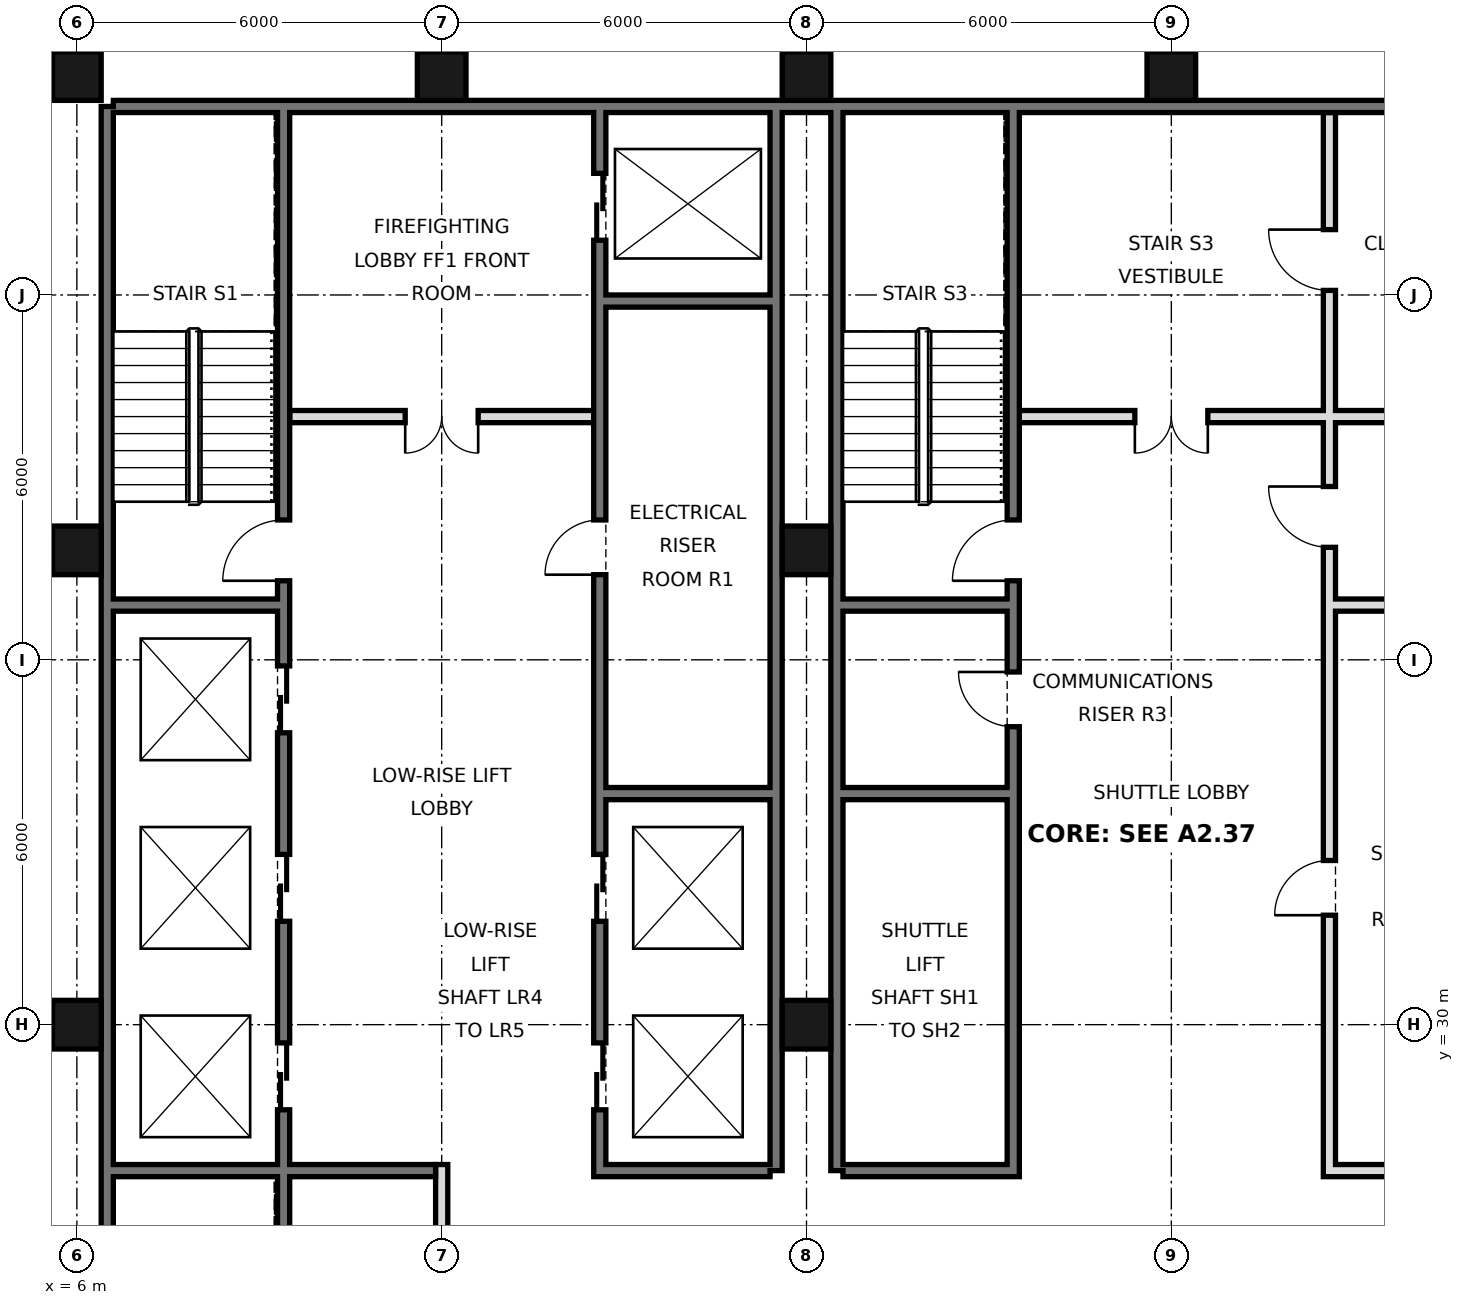
"""IFC4 building model, lengths in metres.
Left out: names, types, materials, properties, quantities, classifications, styles, units other than length and angle.
Written with IfcOpenShell. Run it as: python <this file> out.ifc"""

import sys

from ifc_helpers import new_model, si_unit, direction, frame, frame_2d, origin, origin_2d, place, context, subcontext, project, spatial, rectangle, hollow_rectangle, extrude, element, fill, save


model = new_model("IFC4")
c1 = context("Model", 3, precision=1e-05, world=origin(), true_north=direction((0.0, 1.0)))
c2 = subcontext(c1, "Body", "Model", "MODEL_VIEW")
j1 = project(units=[si_unit("LENGTHUNIT", "METRE"), si_unit("PLANEANGLEUNIT", "RADIAN")], contexts=[c1])
p1 = place(None, origin())
s1 = spatial("IfcSite", under=j1, at=p1, CompositionType="ELEMENT")
p2 = place(p1, origin())
s2 = spatial("IfcBuilding", under=s1, at=p2, CompositionType="ELEMENT")
p3 = place(p2, frame((0.0, 0.0, 147.4)))
s3 = spatial("IfcBuildingStorey", under=s2, at=p3, CompositionType="ELEMENT", Elevation=147.4)
for number, where, z_axis, x_axis in (
    (1, (6.0, 30.0, 0.0), (0.0, 0.0, 1.0), (1.0, 0.0, 0.0)),
    (2, (6.0, 37.8, 0.0), (0.0, 0.0, 1.0), (1.0, 0.0, 0.0)),
    (3, (6.0, 45.6, 0.0), (0.0, 0.0, 1.0), (1.0, 0.0, 0.0)),
    (4, (12.0, 45.6, 0.0), (0.0, 0.0, 1.0), (1.0, 0.0, 0.0)),
    (5, (18.0, 30.0, 0.0), (0.0, 0.0, 1.0), (1.0, 0.0, 0.0)),
    (6, (18.0, 37.8, 0.0), (0.0, 0.0, 1.0), (1.0, 0.0, 0.0)),
    (7, (18.0, 45.6, 0.0), (0.0, 0.0, 1.0), (1.0, 0.0, 0.0)),
    (8, (24.0, 45.6, 0.0), (0.0, 0.0, 1.0), (1.0, 0.0, 0.0)),
):
    element("IfcColumn", number, at=place(p3, frame(where, z_axis=z_axis, x_axis=x_axis)), inside=s3, PredefinedType="COLUMN", context=c2, shape_type="SweptSolid", body=[
        extrude(hollow_rectangle(XDim=0.8, YDim=0.8, WallThickness=0.045, at=origin_2d()), origin(), (0.0, 0.0, 1.0), 3.6),
    ])
p4 = place(p3, frame((6.5, 21.6, 0.0), z_axis=(0.0, 0.0, 1.0), x_axis=(0.0, 1.0, 0.0)))
e9 = element("IfcWall", 9, at=p4, inside=s3, PredefinedType="SOLIDWALL", context=c2, shape_type="SweptSolid", body=[
    extrude(rectangle(XDim=23.5, YDim=0.2, at=frame_2d((11.75, 0.0))), origin(), (0.0, 0.0, 1.0), 3.42),
])
p5 = place(p3, frame((6.6, 45.1, 0.0), z_axis=(0.0, 0.0, 1.0), x_axis=(1.0, 0.0, 0.0)))
e10 = element("IfcWall", 10, at=p5, inside=s3, PredefinedType="SOLIDWALL", context=c2, shape_type="SweptSolid", body=[
    extrude(rectangle(XDim=34.8, YDim=0.2, at=frame_2d((17.4, 0.0))), origin(), (0.0, 0.0, 1.0), 3.42),
])
for number, where, z_axis, x_axis in (
    (11, (17.5, 27.6, 0.0), (0.0, 0.0, 1.0), (0.0, 1.0, 0.0)),
    (12, (18.5, 27.6, 0.0), (0.0, 0.0, 1.0), (0.0, 1.0, 0.0)),
):
    element("IfcWall", number, at=place(p3, frame(where, z_axis=z_axis, x_axis=x_axis)), inside=s3, PredefinedType="SOLIDWALL", context=c2, shape_type="SweptSolid", body=[
        extrude(rectangle(XDim=17.5, YDim=0.2, at=frame_2d((8.75, 0.0))), origin(), (0.0, 0.0, 1.0), 3.42),
    ])
p6 = place(p3, frame((12.0, 21.6, 0.0), z_axis=(0.0, 0.0, 1.0), x_axis=(0.0, 1.0, 0.0)))
e13 = element("IfcWall", 13, at=p6, inside=s3, PredefinedType="PARTITIONING", context=c2, shape_type="SweptSolid", body=[
    extrude(rectangle(XDim=6.1, YDim=0.2, at=frame_2d((3.05, 0.0))), origin(), (0.0, 0.0, 1.0), 3.42),
])
p7 = place(p3, frame((14.6, 27.5, 0.0), z_axis=(0.0, 0.0, 1.0), x_axis=(0.0, 1.0, 0.0)))
e14 = element("IfcWall", 14, at=p7, inside=s3, PredefinedType="SOLIDWALL", context=c2, shape_type="SweptSolid", body=[
    extrude(rectangle(XDim=17.5, YDim=0.2, at=frame_2d((8.75, 0.0))), origin(), (0.0, 0.0, 1.0), 3.42),
])
p8 = place(p7, frame((1.1, 0.0, 0.0)))
e15 = element("IfcOpeningElement", 15, at=p8, cuts=e14, PredefinedType="OPENING", context=c2, shape_type="SweptSolid", body=[
    extrude(rectangle(XDim=1.1, YDim=2.1, at=frame_2d((0.55, 1.05))), frame((0.0, 0.11, 0.0), z_axis=(0.0, -1.0, 0.0), x_axis=(1.0, 0.0, 0.0)), (0.0, 0.0, 1.0), 0.22),
])
p9 = place(p7, frame((4.2, 0.0, 0.0)))
e16 = element("IfcOpeningElement", 16, at=p9, cuts=e14, PredefinedType="OPENING", context=c2, shape_type="SweptSolid", body=[
    extrude(rectangle(XDim=1.1, YDim=2.1, at=frame_2d((0.55, 1.05))), frame((0.0, 0.11, 0.0), z_axis=(0.0, -1.0, 0.0), x_axis=(1.0, 0.0, 0.0)), (0.0, 0.0, 1.0), 0.22),
])
p10 = place(p7, frame((15.4, 0.0, 0.0)))
e17 = element("IfcOpeningElement", 17, at=p10, cuts=e14, PredefinedType="OPENING", context=c2, shape_type="SweptSolid", body=[
    extrude(rectangle(XDim=1.1, YDim=2.1, at=frame_2d((0.55, 1.05))), frame((0.0, 0.11, 0.0), z_axis=(0.0, -1.0, 0.0), x_axis=(1.0, 0.0, 0.0)), (0.0, 0.0, 1.0), 0.22),
])
p11 = place(p7, frame((9.9, 0.0, 0.0)))
e18 = element("IfcOpeningElement", 18, at=p11, cuts=e14, PredefinedType="OPENING", context=c2, shape_type="SweptSolid", body=[
    extrude(rectangle(XDim=0.9, YDim=2.1, at=frame_2d((0.45, 1.05))), frame((0.0, 0.11, 0.0), z_axis=(0.0, -1.0, 0.0), x_axis=(1.0, 0.0, 0.0)), (0.0, 0.0, 1.0), 0.22),
])
p12 = place(p3, frame((21.4, 27.5, 0.0), z_axis=(0.0, 0.0, 1.0), x_axis=(0.0, 1.0, 0.0)))
e19 = element("IfcWall", 19, at=p12, inside=s3, PredefinedType="SOLIDWALL", context=c2, shape_type="SweptSolid", body=[
    extrude(rectangle(XDim=17.5, YDim=0.2, at=frame_2d((8.75, 0.0))), origin(), (0.0, 0.0, 1.0), 3.42),
])
p13 = place(p12, frame((9.8, 0.0, 0.0)))
e20 = element("IfcOpeningElement", 20, at=p13, cuts=e19, PredefinedType="OPENING", context=c2, shape_type="SweptSolid", body=[
    extrude(rectangle(XDim=1.0, YDim=2.1, at=frame_2d((0.5, 1.05))), frame((0.0, 0.11, 0.0), z_axis=(0.0, -1.0, 0.0), x_axis=(1.0, 0.0, 0.0)), (0.0, 0.0, 1.0), 0.22),
])
p14 = place(p12, frame((7.4, 0.0, 0.0)))
e21 = element("IfcOpeningElement", 21, at=p14, cuts=e19, PredefinedType="OPENING", context=c2, shape_type="SweptSolid", body=[
    extrude(rectangle(XDim=0.9, YDim=2.1, at=frame_2d((0.45, 1.05))), frame((0.0, 0.11, 0.0), z_axis=(0.0, -1.0, 0.0), x_axis=(1.0, 0.0, 0.0)), (0.0, 0.0, 1.0), 0.22),
])
p15 = place(p3, frame((26.6, 27.5, 0.0), z_axis=(0.0, 0.0, 1.0), x_axis=(0.0, 1.0, 0.0)))
e22 = element("IfcWall", 22, at=p15, inside=s3, PredefinedType="SOLIDWALL", context=c2, shape_type="SweptSolid", body=[
    extrude(rectangle(XDim=17.5, YDim=0.2, at=frame_2d((8.75, 0.0))), origin(), (0.0, 0.0, 1.0), 3.42),
])
p16 = place(p15, frame((4.3, 0.0, 0.0)))
e23 = element("IfcOpeningElement", 23, at=p16, cuts=e22, PredefinedType="OPENING", context=c2, shape_type="SweptSolid", body=[
    extrude(rectangle(XDim=0.9, YDim=2.1, at=frame_2d((0.45, 1.05))), frame((0.0, 0.11, 0.0), z_axis=(0.0, -1.0, 0.0), x_axis=(1.0, 0.0, 0.0)), (0.0, 0.0, 1.0), 0.22),
])
p17 = place(p15, frame((10.35, 0.0, 0.0)))
e24 = element("IfcOpeningElement", 24, at=p17, cuts=e22, PredefinedType="OPENING", context=c2, shape_type="SweptSolid", body=[
    extrude(rectangle(XDim=1.0, YDim=2.1, at=frame_2d((0.5, 1.05))), frame((0.0, 0.11, 0.0), z_axis=(0.0, -1.0, 0.0), x_axis=(1.0, 0.0, 0.0)), (0.0, 0.0, 1.0), 0.22),
])
p18 = place(p15, frame((14.575, 0.0, 0.0)))
e25 = element("IfcOpeningElement", 25, at=p18, cuts=e22, PredefinedType="OPENING", context=c2, shape_type="SweptSolid", body=[
    extrude(rectangle(XDim=1.0, YDim=2.1, at=frame_2d((0.5, 1.05))), frame((0.0, 0.11, 0.0), z_axis=(0.0, -1.0, 0.0), x_axis=(1.0, 0.0, 0.0)), (0.0, 0.0, 1.0), 0.22),
])
p19 = place(p3, frame((9.4, 21.6, 0.0), z_axis=(0.0, 0.0, 1.0), x_axis=(0.0, 1.0, 0.0)))
e26 = element("IfcWall", 26, at=p19, inside=s3, PredefinedType="SOLIDWALL", context=c2, shape_type="SweptSolid", body=[
    extrude(rectangle(XDim=23.4, YDim=0.2, at=frame_2d((11.7, 0.0))), origin(), (0.0, 0.0, 1.0), 3.42),
])
p20 = place(p19, frame((7.0, 0.0, 0.0)))
e27 = element("IfcOpeningElement", 27, at=p20, cuts=e26, PredefinedType="OPENING", context=c2, shape_type="SweptSolid", body=[
    extrude(rectangle(XDim=1.1, YDim=2.1, at=frame_2d((0.55, 1.05))), frame((0.0, 0.11, 0.0), z_axis=(0.0, -1.0, 0.0), x_axis=(1.0, 0.0, 0.0)), (0.0, 0.0, 1.0), 0.22),
])
p21 = place(p19, frame((10.1, 0.0, 0.0)))
e28 = element("IfcOpeningElement", 28, at=p21, cuts=e26, PredefinedType="OPENING", context=c2, shape_type="SweptSolid", body=[
    extrude(rectangle(XDim=1.1, YDim=2.1, at=frame_2d((0.55, 1.05))), frame((0.0, 0.11, 0.0), z_axis=(0.0, -1.0, 0.0), x_axis=(1.0, 0.0, 0.0)), (0.0, 0.0, 1.0), 0.22),
])
p22 = place(p19, frame((13.2, 0.0, 0.0)))
e29 = element("IfcOpeningElement", 29, at=p22, cuts=e26, PredefinedType="OPENING", context=c2, shape_type="SweptSolid", body=[
    extrude(rectangle(XDim=1.1, YDim=2.1, at=frame_2d((0.55, 1.05))), frame((0.0, 0.11, 0.0), z_axis=(0.0, -1.0, 0.0), x_axis=(1.0, 0.0, 0.0)), (0.0, 0.0, 1.0), 0.22),
])
p23 = place(p19, frame((15.7, 0.0, 0.0)))
e30 = element("IfcOpeningElement", 30, at=p23, cuts=e26, PredefinedType="OPENING", context=c2, shape_type="SweptSolid", body=[
    extrude(rectangle(XDim=1.0, YDim=2.1, at=frame_2d((0.5, 1.05))), frame((0.0, 0.11, 0.0), z_axis=(0.0, -1.0, 0.0), x_axis=(1.0, 0.0, 0.0)), (0.0, 0.0, 1.0), 0.22),
])
p24 = place(p19, frame((0.175, 0.0, 0.0)))
e31 = element("IfcOpeningElement", 31, at=p24, cuts=e26, PredefinedType="OPENING", context=c2, shape_type="SweptSolid", body=[
    extrude(rectangle(XDim=0.9, YDim=2.1, at=frame_2d((0.45, 1.05))), frame((0.0, 0.11, 0.0), z_axis=(0.0, -1.0, 0.0), x_axis=(1.0, 0.0, 0.0)), (0.0, 0.0, 1.0), 0.22),
])
for number, where, z_axis, x_axis in (
    (32, (14.7, 27.6, 0.0), (0.0, 0.0, 1.0), (1.0, 0.0, 0.0)),
    (33, (18.6, 27.6, 0.0), (0.0, 0.0, 1.0), (1.0, 0.0, 0.0)),
    (34, (26.7, 27.6, 0.0), (0.0, 0.0, 1.0), (1.0, 0.0, 0.0)),
):
    element("IfcWall", number, at=place(p3, frame(where, z_axis=z_axis, x_axis=x_axis)), inside=s3, PredefinedType="SOLIDWALL", context=c2, shape_type="SweptSolid", body=[
        extrude(rectangle(XDim=2.7, YDim=0.2, at=frame_2d((1.35, 0.0))), origin(), (0.0, 0.0, 1.0), 3.42),
    ])
p25 = place(p3, frame((6.6, 27.6, 0.0), z_axis=(0.0, 0.0, 1.0), x_axis=(1.0, 0.0, 0.0)))
e35 = element("IfcWall", 35, at=p25, inside=s3, PredefinedType="SOLIDWALL", context=c2, shape_type="SweptSolid", body=[
    extrude(rectangle(XDim=5.3, YDim=0.2, at=frame_2d((2.65, 0.0))), origin(), (0.0, 0.0, 1.0), 3.42),
])
for number, where, z_axis, x_axis in (
    (36, (14.7, 33.8, 0.0), (0.0, 0.0, 1.0), (1.0, 0.0, 0.0)),
    (37, (18.6, 33.8, 0.0), (0.0, 0.0, 1.0), (1.0, 0.0, 0.0)),
    (38, (18.6, 36.9, 0.0), (0.0, 0.0, 1.0), (1.0, 0.0, 0.0)),
    (39, (26.7, 36.9, 0.0), (0.0, 0.0, 1.0), (1.0, 0.0, 0.0)),
    (40, (6.6, 36.9, 0.0), (0.0, 0.0, 1.0), (1.0, 0.0, 0.0)),
):
    element("IfcWall", number, at=place(p3, frame(where, z_axis=z_axis, x_axis=x_axis)), inside=s3, PredefinedType="SOLIDWALL", context=c2, shape_type="SweptSolid", body=[
        extrude(rectangle(XDim=2.7, YDim=0.2, at=frame_2d((1.35, 0.0))), origin(), (0.0, 0.0, 1.0), 3.42),
    ])
p26 = place(p3, frame((21.5, 40.0, 0.0), z_axis=(0.0, 0.0, 1.0), x_axis=(1.0, 0.0, 0.0)))
e41 = element("IfcWall", 41, at=p26, inside=s3, PredefinedType="PARTITIONING", context=c2, shape_type="SweptSolid", body=[
    extrude(rectangle(XDim=7.9, YDim=0.2, at=frame_2d((3.95, 0.0))), origin(), (0.0, 0.0, 1.0), 3.42),
])
p27 = place(p26, frame((1.9, 0.0, 0.0)))
e42 = element("IfcOpeningElement", 42, at=p27, cuts=e41, PredefinedType="OPENING", context=c2, shape_type="SweptSolid", body=[
    extrude(rectangle(XDim=1.2, YDim=2.1, at=frame_2d((0.6, 1.05))), frame((0.0, 0.11, 0.0), z_axis=(0.0, -1.0, 0.0), x_axis=(1.0, 0.0, 0.0)), (0.0, 0.0, 1.0), 0.22),
])
p28 = place(p3, frame((9.5, 40.0, 0.0), z_axis=(0.0, 0.0, 1.0), x_axis=(1.0, 0.0, 0.0)))
e43 = element("IfcWall", 43, at=p28, inside=s3, PredefinedType="PARTITIONING", context=c2, shape_type="SweptSolid", body=[
    extrude(rectangle(XDim=5.0, YDim=0.2, at=frame_2d((2.5, 0.0))), origin(), (0.0, 0.0, 1.0), 3.42),
])
p29 = place(p28, frame((1.9, 0.0, 0.0)))
e44 = element("IfcOpeningElement", 44, at=p29, cuts=e43, PredefinedType="OPENING", context=c2, shape_type="SweptSolid", body=[
    extrude(rectangle(XDim=1.2, YDim=2.1, at=frame_2d((0.6, 1.05))), frame((0.0, 0.11, 0.0), z_axis=(0.0, -1.0, 0.0), x_axis=(1.0, 0.0, 0.0)), (0.0, 0.0, 1.0), 0.22),
])
p30 = place(p3, frame((14.7, 41.9, 0.0), z_axis=(0.0, 0.0, 1.0), x_axis=(1.0, 0.0, 0.0)))
e45 = element("IfcWall", 45, at=p30, inside=s3, PredefinedType="SOLIDWALL", context=c2, shape_type="SweptSolid", body=[
    extrude(rectangle(XDim=2.7, YDim=0.2, at=frame_2d((1.35, 0.0))), origin(), (0.0, 0.0, 1.0), 3.42),
])
p31 = place(p29, frame((1.2, 0.0, 0.0), z_axis=(0.0, 0.0, 1.0), x_axis=(-1.0, 0.0, 0.0)))
e46 = element("IfcDoor", 46, at=p31, inside=s3, OperationType="DOUBLE_DOOR_SINGLE_SWING", PredefinedType="DOOR", context=c2, shape_type="SweptSolid", body=[
    extrude(rectangle(XDim=1.2, YDim=2.1, at=frame_2d((0.6, 1.05))), frame((0.0, 0.025, 0.0), z_axis=(0.0, -1.0, 0.0), x_axis=(1.0, 0.0, 0.0)), (0.0, 0.0, 1.0), 0.05),
])
fill(e44, e46)
p32 = place(p27, frame((1.2, 0.0, 0.0), z_axis=(0.0, 0.0, 1.0), x_axis=(-1.0, 0.0, 0.0)))
e47 = element("IfcDoor", 47, at=p32, inside=s3, OperationType="DOUBLE_DOOR_SINGLE_SWING", PredefinedType="DOOR", context=c2, shape_type="SweptSolid", body=[
    extrude(rectangle(XDim=1.2, YDim=2.1, at=frame_2d((0.6, 1.05))), frame((0.0, 0.025, 0.0), z_axis=(0.0, -1.0, 0.0), x_axis=(1.0, 0.0, 0.0)), (0.0, 0.0, 1.0), 0.05),
])
fill(e42, e47)
p33 = place(p8, origin())
e48 = element("IfcDoor", 48, at=p33, inside=s3, OperationType="DOUBLE_DOOR_SLIDING", PredefinedType="DOOR", context=c2, shape_type="SweptSolid", body=[
    extrude(rectangle(XDim=1.1, YDim=2.1, at=frame_2d((0.55, 1.05))), frame((0.0, 0.025, 0.0), z_axis=(0.0, -1.0, 0.0), x_axis=(1.0, 0.0, 0.0)), (0.0, 0.0, 1.0), 0.05),
])
fill(e15, e48)
p34 = place(p9, origin())
e49 = element("IfcDoor", 49, at=p34, inside=s3, OperationType="DOUBLE_DOOR_SLIDING", PredefinedType="DOOR", context=c2, shape_type="SweptSolid", body=[
    extrude(rectangle(XDim=1.1, YDim=2.1, at=frame_2d((0.55, 1.05))), frame((0.0, 0.025, 0.0), z_axis=(0.0, -1.0, 0.0), x_axis=(1.0, 0.0, 0.0)), (0.0, 0.0, 1.0), 0.05),
])
fill(e16, e49)
p35 = place(p10, origin())
e50 = element("IfcDoor", 50, at=p35, inside=s3, OperationType="DOUBLE_DOOR_SLIDING", PredefinedType="DOOR", context=c2, shape_type="SweptSolid", body=[
    extrude(rectangle(XDim=1.1, YDim=2.1, at=frame_2d((0.55, 1.05))), frame((0.0, 0.025, 0.0), z_axis=(0.0, -1.0, 0.0), x_axis=(1.0, 0.0, 0.0)), (0.0, 0.0, 1.0), 0.05),
])
fill(e17, e50)
p36 = place(p20, origin())
e51 = element("IfcDoor", 51, at=p36, inside=s3, OperationType="DOUBLE_DOOR_SLIDING", PredefinedType="DOOR", context=c2, shape_type="SweptSolid", body=[
    extrude(rectangle(XDim=1.1, YDim=2.1, at=frame_2d((0.55, 1.05))), frame((0.0, 0.025, 0.0), z_axis=(0.0, -1.0, 0.0), x_axis=(1.0, 0.0, 0.0)), (0.0, 0.0, 1.0), 0.05),
])
fill(e27, e51)
p37 = place(p21, origin())
e52 = element("IfcDoor", 52, at=p37, inside=s3, OperationType="DOUBLE_DOOR_SLIDING", PredefinedType="DOOR", context=c2, shape_type="SweptSolid", body=[
    extrude(rectangle(XDim=1.1, YDim=2.1, at=frame_2d((0.55, 1.05))), frame((0.0, 0.025, 0.0), z_axis=(0.0, -1.0, 0.0), x_axis=(1.0, 0.0, 0.0)), (0.0, 0.0, 1.0), 0.05),
])
fill(e28, e52)
p38 = place(p22, origin())
e53 = element("IfcDoor", 53, at=p38, inside=s3, OperationType="DOUBLE_DOOR_SLIDING", PredefinedType="DOOR", context=c2, shape_type="SweptSolid", body=[
    extrude(rectangle(XDim=1.1, YDim=2.1, at=frame_2d((0.55, 1.05))), frame((0.0, 0.025, 0.0), z_axis=(0.0, -1.0, 0.0), x_axis=(1.0, 0.0, 0.0)), (0.0, 0.0, 1.0), 0.05),
])
fill(e29, e53)
p39 = place(p23, origin())
e54 = element("IfcDoor", 54, at=p39, inside=s3, OperationType="SINGLE_SWING_LEFT", PredefinedType="DOOR", context=c2, shape_type="SweptSolid", body=[
    extrude(rectangle(XDim=1.0, YDim=2.1, at=frame_2d((0.5, 1.05))), frame((0.0, 0.025, 0.0), z_axis=(0.0, -1.0, 0.0), x_axis=(1.0, 0.0, 0.0)), (0.0, 0.0, 1.0), 0.05),
])
fill(e30, e54)
p40 = place(p13, origin())
e55 = element("IfcDoor", 55, at=p40, inside=s3, OperationType="SINGLE_SWING_LEFT", PredefinedType="DOOR", context=c2, shape_type="SweptSolid", body=[
    extrude(rectangle(XDim=1.0, YDim=2.1, at=frame_2d((0.5, 1.05))), frame((0.0, 0.025, 0.0), z_axis=(0.0, -1.0, 0.0), x_axis=(1.0, 0.0, 0.0)), (0.0, 0.0, 1.0), 0.05),
])
fill(e20, e55)
p41 = place(p11, origin())
e56 = element("IfcDoor", 56, at=p41, inside=s3, OperationType="SINGLE_SWING_LEFT", PredefinedType="DOOR", context=c2, shape_type="SweptSolid", body=[
    extrude(rectangle(XDim=0.9, YDim=2.1, at=frame_2d((0.45, 1.05))), frame((0.0, 0.025, 0.0), z_axis=(0.0, -1.0, 0.0), x_axis=(1.0, 0.0, 0.0)), (0.0, 0.0, 1.0), 0.05),
])
fill(e18, e56)
p42 = place(p14, frame((0.9, 0.0, 0.0), z_axis=(0.0, 0.0, 1.0), x_axis=(-1.0, 0.0, 0.0)))
e57 = element("IfcDoor", 57, at=p42, inside=s3, OperationType="SINGLE_SWING_LEFT", PredefinedType="DOOR", context=c2, shape_type="SweptSolid", body=[
    extrude(rectangle(XDim=0.9, YDim=2.1, at=frame_2d((0.45, 1.05))), frame((0.0, 0.025, 0.0), z_axis=(0.0, -1.0, 0.0), x_axis=(1.0, 0.0, 0.0)), (0.0, 0.0, 1.0), 0.05),
])
fill(e21, e57)
p43 = place(p16, origin())
e58 = element("IfcDoor", 58, at=p43, inside=s3, OperationType="SINGLE_SWING_LEFT", PredefinedType="DOOR", context=c2, shape_type="SweptSolid", body=[
    extrude(rectangle(XDim=0.9, YDim=2.1, at=frame_2d((0.45, 1.05))), frame((0.0, 0.025, 0.0), z_axis=(0.0, -1.0, 0.0), x_axis=(1.0, 0.0, 0.0)), (0.0, 0.0, 1.0), 0.05),
])
fill(e23, e58)
p44 = place(p17, frame((1.0, 0.0, 0.0), z_axis=(0.0, 0.0, 1.0), x_axis=(-1.0, 0.0, 0.0)))
e59 = element("IfcDoor", 59, at=p44, inside=s3, OperationType="SINGLE_SWING_LEFT", PredefinedType="DOOR", context=c2, shape_type="SweptSolid", body=[
    extrude(rectangle(XDim=1.0, YDim=2.1, at=frame_2d((0.5, 1.05))), frame((0.0, 0.025, 0.0), z_axis=(0.0, -1.0, 0.0), x_axis=(1.0, 0.0, 0.0)), (0.0, 0.0, 1.0), 0.05),
])
fill(e24, e59)
p45 = place(p18, frame((1.0, 0.0, 0.0), z_axis=(0.0, 0.0, 1.0), x_axis=(-1.0, 0.0, 0.0)))
e60 = element("IfcDoor", 60, at=p45, inside=s3, OperationType="SINGLE_SWING_LEFT", PredefinedType="DOOR", context=c2, shape_type="SweptSolid", body=[
    extrude(rectangle(XDim=1.0, YDim=2.1, at=frame_2d((0.5, 1.05))), frame((0.0, 0.025, 0.0), z_axis=(0.0, -1.0, 0.0), x_axis=(1.0, 0.0, 0.0)), (0.0, 0.0, 1.0), 0.05),
])
fill(e25, e60)
save(model, sys.argv[1])
